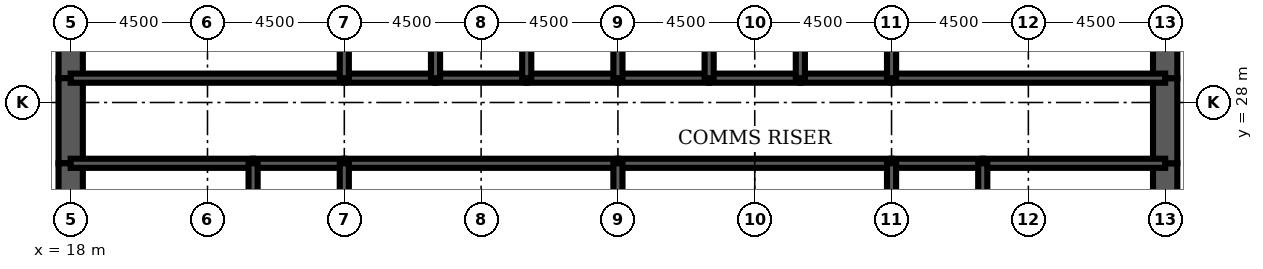
"""IFC4 building model, lengths in metres.
Left out: names, types, materials, properties, quantities, classifications, styles, units other than length and angle.
Written with IfcOpenShell. Run it as: python <this file> out.ifc"""

import sys

from ifc_helpers import new_model, si_unit, direction, frame, frame_2d, origin, place, context, subcontext, project, spatial, rectangle, extrude, element, fill, save


model = new_model("IFC4")
c1 = context("Model", 3, precision=1e-05, world=origin(), true_north=direction((0.0, 1.0)))
c2 = subcontext(c1, "Body", "Model", "MODEL_VIEW")
j1 = project(units=[si_unit("LENGTHUNIT", "METRE"), si_unit("PLANEANGLEUNIT", "RADIAN")], contexts=[c1])
p1 = place(None, origin())
s1 = spatial("IfcSite", under=j1, at=p1, CompositionType="ELEMENT")
p2 = place(p1, origin())
s2 = spatial("IfcBuilding", under=s1, at=p2, CompositionType="ELEMENT")
p3 = place(p2, frame((0.0, 0.0, 248.8)))
s3 = spatial("IfcBuildingStorey", under=s2, at=p3, CompositionType="ELEMENT", Elevation=248.8)
p4 = place(p3, frame((18.0, 32.0, 0.0), z_axis=(0.0, 0.0, 1.0), x_axis=(0.0, -1.0, 0.0)))
e1 = element("IfcWall", 1, at=p4, inside=s3, PredefinedType="SHEAR", context=c2, shape_type="SweptSolid", body=[
    extrude(rectangle(XDim=3.2, YDim=0.8, at=frame_2d((1.6, 0.0))), origin(), (0.0, 0.0, 1.0), 4.2),
])
p5 = place(p3, frame((18.0, 28.8, 0.0), z_axis=(0.0, 0.0, 1.0), x_axis=(0.0, -1.0, 0.0)))
e2 = element("IfcWall", 2, at=p5, inside=s3, PredefinedType="SHEAR", context=c2, shape_type="SweptSolid", body=[
    extrude(rectangle(XDim=2.8, YDim=0.8, at=frame_2d((1.4, 0.0))), origin(), (0.0, 0.0, 1.0), 4.2),
])
p6 = place(p5, frame((0.4, 0.0, 0.0)))
e3 = element("IfcOpeningElement", 3, at=p6, cuts=e2, PredefinedType="OPENING", context=c2, shape_type="SweptSolid", body=[
    extrude(rectangle(XDim=1.8, YDim=2.1, at=frame_2d((0.9, 1.05))), frame((0.0, 0.41, 0.0), z_axis=(0.0, -1.0, 0.0), x_axis=(1.0, 0.0, 0.0)), (0.0, 0.0, 1.0), 0.82),
])
for number, where, z_axis, x_axis in (
    (4, (18.0, 26.0, 0.0), (0.0, 0.0, 1.0), (0.0, -1.0, 0.0)),
    (5, (54.0, 22.0, 0.0), (0.0, 0.0, 1.0), (0.0, 1.0, 0.0)),
):
    element("IfcWall", number, at=place(p3, frame(where, z_axis=z_axis, x_axis=x_axis)), inside=s3, PredefinedType="SHEAR", context=c2, shape_type="SweptSolid", body=[
        extrude(rectangle(XDim=4.0, YDim=0.8, at=frame_2d((2.0, 0.0))), origin(), (0.0, 0.0, 1.0), 4.2),
    ])
p7 = place(p3, frame((54.0, 26.0, 0.0), z_axis=(0.0, 0.0, 1.0), x_axis=(0.0, 1.0, 0.0)))
e6 = element("IfcWall", 6, at=p7, inside=s3, PredefinedType="SHEAR", context=c2, shape_type="SweptSolid", body=[
    extrude(rectangle(XDim=2.8, YDim=0.8, at=frame_2d((1.4, 0.0))), origin(), (0.0, 0.0, 1.0), 4.2),
])
p8 = place(p7, frame((0.6, 0.0, 0.0)))
e7 = element("IfcOpeningElement", 7, at=p8, cuts=e6, PredefinedType="OPENING", context=c2, shape_type="SweptSolid", body=[
    extrude(rectangle(XDim=1.8, YDim=2.1, at=frame_2d((0.9, 1.05))), frame((0.0, 0.41, 0.0), z_axis=(0.0, -1.0, 0.0), x_axis=(1.0, 0.0, 0.0)), (0.0, 0.0, 1.0), 0.82),
])
p9 = place(p3, frame((54.0, 28.8, 0.0), z_axis=(0.0, 0.0, 1.0), x_axis=(0.0, 1.0, 0.0)))
e8 = element("IfcWall", 8, at=p9, inside=s3, PredefinedType="SHEAR", context=c2, shape_type="SweptSolid", body=[
    extrude(rectangle(XDim=3.2, YDim=0.8, at=frame_2d((1.6, 0.0))), origin(), (0.0, 0.0, 1.0), 4.2),
])
p10 = place(p3, frame((18.0, 28.8, 0.0), z_axis=(0.0, 0.0, 1.0), x_axis=(1.0, 0.0, 0.0)))
e9 = element("IfcWall", 9, at=p10, inside=s3, PredefinedType="SOLIDWALL", context=c2, shape_type="SweptSolid", body=[
    extrude(rectangle(XDim=9.0, YDim=0.3, at=frame_2d((4.5, 0.0))), origin(), (0.0, 0.0, 1.0), 4.2),
])
p11 = place(p10, frame((0.65, 0.0, 0.0)))
e10 = element("IfcOpeningElement", 10, at=p11, cuts=e9, PredefinedType="OPENING", context=c2, shape_type="SweptSolid", body=[
    extrude(rectangle(XDim=1.0, YDim=2.1, at=frame_2d((0.5, 1.05))), frame((0.0, 0.16, 0.0), z_axis=(0.0, -1.0, 0.0), x_axis=(1.0, 0.0, 0.0)), (0.0, 0.0, 1.0), 0.32),
])
p12 = place(p3, frame((27.0, 28.8, 0.0), z_axis=(0.0, 0.0, 1.0), x_axis=(1.0, 0.0, 0.0)))
e11 = element("IfcWall", 11, at=p12, inside=s3, PredefinedType="SOLIDWALL", context=c2, shape_type="SweptSolid", body=[
    extrude(rectangle(XDim=3.0, YDim=0.3, at=frame_2d((1.5, 0.0))), origin(), (0.0, 0.0, 1.0), 4.2),
])
p13 = place(p12, frame((0.95, 0.0, 0.0)))
e12 = element("IfcOpeningElement", 12, at=p13, cuts=e11, PredefinedType="OPENING", context=c2, shape_type="SweptSolid", body=[
    extrude(rectangle(XDim=1.1, YDim=2.2, at=frame_2d((0.55, 1.1))), frame((0.0, 0.16, 0.0), z_axis=(0.0, -1.0, 0.0), x_axis=(1.0, 0.0, 0.0)), (0.0, 0.0, 1.0), 0.32),
])
p14 = place(p3, frame((30.0, 28.8, 0.0), z_axis=(0.0, 0.0, 1.0), x_axis=(1.0, 0.0, 0.0)))
e13 = element("IfcWall", 13, at=p14, inside=s3, PredefinedType="SOLIDWALL", context=c2, shape_type="SweptSolid", body=[
    extrude(rectangle(XDim=3.0, YDim=0.3, at=frame_2d((1.5, 0.0))), origin(), (0.0, 0.0, 1.0), 4.2),
])
p15 = place(p14, frame((0.95, 0.0, 0.0)))
e14 = element("IfcOpeningElement", 14, at=p15, cuts=e13, PredefinedType="OPENING", context=c2, shape_type="SweptSolid", body=[
    extrude(rectangle(XDim=1.1, YDim=2.2, at=frame_2d((0.55, 1.1))), frame((0.0, 0.16, 0.0), z_axis=(0.0, -1.0, 0.0), x_axis=(1.0, 0.0, 0.0)), (0.0, 0.0, 1.0), 0.32),
])
p16 = place(p3, frame((33.0, 28.8, 0.0), z_axis=(0.0, 0.0, 1.0), x_axis=(1.0, 0.0, 0.0)))
e15 = element("IfcWall", 15, at=p16, inside=s3, PredefinedType="SOLIDWALL", context=c2, shape_type="SweptSolid", body=[
    extrude(rectangle(XDim=3.0, YDim=0.3, at=frame_2d((1.5, 0.0))), origin(), (0.0, 0.0, 1.0), 4.2),
])
p17 = place(p16, frame((0.95, 0.0, 0.0)))
e16 = element("IfcOpeningElement", 16, at=p17, cuts=e15, PredefinedType="OPENING", context=c2, shape_type="SweptSolid", body=[
    extrude(rectangle(XDim=1.1, YDim=2.2, at=frame_2d((0.55, 1.1))), frame((0.0, 0.16, 0.0), z_axis=(0.0, -1.0, 0.0), x_axis=(1.0, 0.0, 0.0)), (0.0, 0.0, 1.0), 0.32),
])
for number, where, z_axis, x_axis in (
    (17, (36.0, 28.8, 0.0), (0.0, 0.0, 1.0), (1.0, 0.0, 0.0)),
    (18, (39.0, 28.8, 0.0), (0.0, 0.0, 1.0), (1.0, 0.0, 0.0)),
):
    element("IfcWall", number, at=place(p3, frame(where, z_axis=z_axis, x_axis=x_axis)), inside=s3, PredefinedType="SOLIDWALL", context=c2, shape_type="SweptSolid", body=[
        extrude(rectangle(XDim=3.0, YDim=0.3, at=frame_2d((1.5, 0.0))), origin(), (0.0, 0.0, 1.0), 4.2),
    ])
p18 = place(p3, frame((42.0, 28.8, 0.0), z_axis=(0.0, 0.0, 1.0), x_axis=(1.0, 0.0, 0.0)))
e19 = element("IfcWall", 19, at=p18, inside=s3, PredefinedType="SOLIDWALL", context=c2, shape_type="SweptSolid", body=[
    extrude(rectangle(XDim=3.0, YDim=0.3, at=frame_2d((1.5, 0.0))), origin(), (0.0, 0.0, 1.0), 4.2),
])
p19 = place(p18, frame((0.95, 0.0, 0.0)))
e20 = element("IfcOpeningElement", 20, at=p19, cuts=e19, PredefinedType="OPENING", context=c2, shape_type="SweptSolid", body=[
    extrude(rectangle(XDim=1.1, YDim=2.2, at=frame_2d((0.55, 1.1))), frame((0.0, 0.16, 0.0), z_axis=(0.0, -1.0, 0.0), x_axis=(1.0, 0.0, 0.0)), (0.0, 0.0, 1.0), 0.32),
])
p20 = place(p3, frame((45.0, 28.8, 0.0), z_axis=(0.0, 0.0, 1.0), x_axis=(1.0, 0.0, 0.0)))
e21 = element("IfcWall", 21, at=p20, inside=s3, PredefinedType="SOLIDWALL", context=c2, shape_type="SweptSolid", body=[
    extrude(rectangle(XDim=9.0, YDim=0.3, at=frame_2d((4.5, 0.0))), origin(), (0.0, 0.0, 1.0), 4.2),
])
p21 = place(p20, frame((7.35, 0.0, 0.0)))
e22 = element("IfcOpeningElement", 22, at=p21, cuts=e21, PredefinedType="OPENING", context=c2, shape_type="SweptSolid", body=[
    extrude(rectangle(XDim=1.0, YDim=2.1, at=frame_2d((0.5, 1.05))), frame((0.0, 0.16, 0.0), z_axis=(0.0, -1.0, 0.0), x_axis=(1.0, 0.0, 0.0)), (0.0, 0.0, 1.0), 0.32),
])
p22 = place(p3, frame((18.0, 26.0, 0.0), z_axis=(0.0, 0.0, 1.0), x_axis=(1.0, 0.0, 0.0)))
e23 = element("IfcWall", 23, at=p22, inside=s3, PredefinedType="SOLIDWALL", context=c2, shape_type="SweptSolid", body=[
    extrude(rectangle(XDim=6.0, YDim=0.3, at=frame_2d((3.0, 0.0))), origin(), (0.0, 0.0, 1.0), 4.2),
])
p23 = place(p3, frame((24.0, 26.0, 0.0), z_axis=(0.0, 0.0, 1.0), x_axis=(1.0, 0.0, 0.0)))
e24 = element("IfcWall", 24, at=p23, inside=s3, PredefinedType="SOLIDWALL", context=c2, shape_type="SweptSolid", body=[
    extrude(rectangle(XDim=3.0, YDim=0.3, at=frame_2d((1.5, 0.0))), origin(), (0.0, 0.0, 1.0), 4.2),
])
for number, where, z_axis, x_axis in (
    (25, (27.0, 26.0, 0.0), (0.0, 0.0, 1.0), (1.0, 0.0, 0.0)),
    (26, (36.0, 26.0, 0.0), (0.0, 0.0, 1.0), (1.0, 0.0, 0.0)),
):
    element("IfcWall", number, at=place(p3, frame(where, z_axis=z_axis, x_axis=x_axis)), inside=s3, PredefinedType="SOLIDWALL", context=c2, shape_type="SweptSolid", body=[
        extrude(rectangle(XDim=9.0, YDim=0.3, at=frame_2d((4.5, 0.0))), origin(), (0.0, 0.0, 1.0), 4.2),
    ])
p24 = place(p3, frame((45.0, 26.0, 0.0), z_axis=(0.0, 0.0, 1.0), x_axis=(1.0, 0.0, 0.0)))
e27 = element("IfcWall", 27, at=p24, inside=s3, PredefinedType="SOLIDWALL", context=c2, shape_type="SweptSolid", body=[
    extrude(rectangle(XDim=3.0, YDim=0.3, at=frame_2d((1.5, 0.0))), origin(), (0.0, 0.0, 1.0), 4.2),
])
p25 = place(p3, frame((48.0, 26.0, 0.0), z_axis=(0.0, 0.0, 1.0), x_axis=(1.0, 0.0, 0.0)))
e28 = element("IfcWall", 28, at=p25, inside=s3, PredefinedType="SOLIDWALL", context=c2, shape_type="SweptSolid", body=[
    extrude(rectangle(XDim=6.0, YDim=0.3, at=frame_2d((3.0, 0.0))), origin(), (0.0, 0.0, 1.0), 4.2),
])
for number, where, z_axis, x_axis in (
    (29, (27.0, 28.8, 0.0), (0.0, 0.0, 1.0), (0.0, 1.0, 0.0)),
    (30, (30.0, 28.8, 0.0), (0.0, 0.0, 1.0), (0.0, 1.0, 0.0)),
    (31, (33.0, 28.8, 0.0), (0.0, 0.0, 1.0), (0.0, 1.0, 0.0)),
    (32, (36.0, 28.8, 0.0), (0.0, 0.0, 1.0), (0.0, 1.0, 0.0)),
    (33, (39.0, 28.8, 0.0), (0.0, 0.0, 1.0), (0.0, 1.0, 0.0)),
    (34, (42.0, 28.8, 0.0), (0.0, 0.0, 1.0), (0.0, 1.0, 0.0)),
    (35, (45.0, 28.8, 0.0), (0.0, 0.0, 1.0), (0.0, 1.0, 0.0)),
):
    element("IfcWall", number, at=place(p3, frame(where, z_axis=z_axis, x_axis=x_axis)), inside=s3, PredefinedType="SOLIDWALL", context=c2, shape_type="SweptSolid", body=[
        extrude(rectangle(XDim=3.2, YDim=0.3, at=frame_2d((1.6, 0.0))), origin(), (0.0, 0.0, 1.0), 4.2),
    ])
for number, where, z_axis, x_axis in (
    (36, (24.0, 22.0, 0.0), (0.0, 0.0, 1.0), (0.0, 1.0, 0.0)),
    (37, (27.0, 22.0, 0.0), (0.0, 0.0, 1.0), (0.0, 1.0, 0.0)),
    (38, (36.0, 22.0, 0.0), (0.0, 0.0, 1.0), (0.0, 1.0, 0.0)),
    (39, (45.0, 22.0, 0.0), (0.0, 0.0, 1.0), (0.0, 1.0, 0.0)),
    (40, (48.0, 22.0, 0.0), (0.0, 0.0, 1.0), (0.0, 1.0, 0.0)),
):
    element("IfcWall", number, at=place(p3, frame(where, z_axis=z_axis, x_axis=x_axis)), inside=s3, PredefinedType="SOLIDWALL", context=c2, shape_type="SweptSolid", body=[
        extrude(rectangle(XDim=4.0, YDim=0.3, at=frame_2d((2.0, 0.0))), origin(), (0.0, 0.0, 1.0), 4.2),
    ])
p26 = place(p3, frame((42.0, 22.15, 0.0), z_axis=(0.0, 0.0, 1.0), x_axis=(0.0, 1.0, 0.0)))
e41 = element("IfcWall", 41, at=p26, inside=s3, PredefinedType="PARTITIONING", context=c2, shape_type="SweptSolid", body=[
    extrude(rectangle(XDim=3.7, YDim=0.15, at=frame_2d((1.85, 0.0))), origin(), (0.0, 0.0, 1.0), 3.0),
])
p27 = place(p26, frame((2.2, 0.0, 0.0)))
e42 = element("IfcOpeningElement", 42, at=p27, cuts=e41, PredefinedType="OPENING", context=c2, shape_type="SweptSolid", body=[
    extrude(rectangle(XDim=1.0, YDim=2.1, at=frame_2d((0.5, 1.05))), frame((0.0, 0.085, 0.0), z_axis=(0.0, -1.0, 0.0), x_axis=(1.0, 0.0, 0.0)), (0.0, 0.0, 1.0), 0.17),
])
p28 = place(p3, frame((20.575, 22.15, 0.0), z_axis=(0.0, 0.0, 1.0), x_axis=(0.0, 1.0, 0.0)))
e43 = element("IfcWall", 43, at=p28, inside=s3, PredefinedType="PARTITIONING", context=c2, shape_type="SweptSolid", body=[
    extrude(rectangle(XDim=3.7, YDim=0.15, at=frame_2d((1.85, 0.0))), origin(), (0.0, 0.0, 1.0), 3.0),
])
p29 = place(p27, origin())
e44 = element("IfcDoor", 44, at=p29, inside=s3, OperationType="SINGLE_SWING_RIGHT", PredefinedType="DOOR", context=c2, shape_type="SweptSolid", body=[
    extrude(rectangle(XDim=1.0, YDim=2.1, at=frame_2d((0.5, 1.05))), frame((0.0, 0.025, 0.0), z_axis=(0.0, -1.0, 0.0), x_axis=(1.0, 0.0, 0.0)), (0.0, 0.0, 1.0), 0.05),
])
fill(e42, e44)
p30 = place(p19, origin())
e45 = element("IfcDoor", 45, at=p30, inside=s3, OperationType="DOUBLE_DOOR_SLIDING", PredefinedType="USERDEFINED", context=c2, shape_type="SweptSolid", body=[
    extrude(rectangle(XDim=1.1, YDim=2.2, at=frame_2d((0.55, 1.1))), frame((0.0, 0.025, 0.0), z_axis=(0.0, -1.0, 0.0), x_axis=(1.0, 0.0, 0.0)), (0.0, 0.0, 1.0), 0.05),
])
fill(e20, e45)
p31 = place(p13, origin())
e46 = element("IfcDoor", 46, at=p31, inside=s3, OperationType="DOUBLE_DOOR_SLIDING", PredefinedType="USERDEFINED", context=c2, shape_type="SweptSolid", body=[
    extrude(rectangle(XDim=1.1, YDim=2.2, at=frame_2d((0.55, 1.1))), frame((0.0, 0.025, 0.0), z_axis=(0.0, -1.0, 0.0), x_axis=(1.0, 0.0, 0.0)), (0.0, 0.0, 1.0), 0.05),
])
fill(e12, e46)
p32 = place(p15, origin())
e47 = element("IfcDoor", 47, at=p32, inside=s3, OperationType="DOUBLE_DOOR_SLIDING", PredefinedType="USERDEFINED", context=c2, shape_type="SweptSolid", body=[
    extrude(rectangle(XDim=1.1, YDim=2.2, at=frame_2d((0.55, 1.1))), frame((0.0, 0.025, 0.0), z_axis=(0.0, -1.0, 0.0), x_axis=(1.0, 0.0, 0.0)), (0.0, 0.0, 1.0), 0.05),
])
fill(e14, e47)
p33 = place(p17, origin())
e48 = element("IfcDoor", 48, at=p33, inside=s3, OperationType="DOUBLE_DOOR_SLIDING", PredefinedType="USERDEFINED", context=c2, shape_type="SweptSolid", body=[
    extrude(rectangle(XDim=1.1, YDim=2.2, at=frame_2d((0.55, 1.1))), frame((0.0, 0.025, 0.0), z_axis=(0.0, -1.0, 0.0), x_axis=(1.0, 0.0, 0.0)), (0.0, 0.0, 1.0), 0.05),
])
fill(e16, e48)
p34 = place(p11, origin())
e49 = element("IfcDoor", 49, at=p34, inside=s3, OperationType="SINGLE_SWING_LEFT", PredefinedType="DOOR", context=c2, shape_type="SweptSolid", body=[
    extrude(rectangle(XDim=1.0, YDim=2.1, at=frame_2d((0.5, 1.05))), frame((0.0, 0.025, 0.0), z_axis=(0.0, -1.0, 0.0), x_axis=(1.0, 0.0, 0.0)), (0.0, 0.0, 1.0), 0.05),
])
fill(e10, e49)
p35 = place(p21, origin())
e50 = element("IfcDoor", 50, at=p35, inside=s3, OperationType="SINGLE_SWING_RIGHT", PredefinedType="DOOR", context=c2, shape_type="SweptSolid", body=[
    extrude(rectangle(XDim=1.0, YDim=2.1, at=frame_2d((0.5, 1.05))), frame((0.0, 0.025, 0.0), z_axis=(0.0, -1.0, 0.0), x_axis=(1.0, 0.0, 0.0)), (0.0, 0.0, 1.0), 0.05),
])
fill(e22, e50)
p36 = place(p6, origin())
e51 = element("IfcDoor", 51, at=p36, inside=s3, OperationType="SINGLE_SWING_LEFT", PredefinedType="DOOR", context=c2, shape_type="SweptSolid", body=[
    extrude(rectangle(XDim=1.8, YDim=2.1, at=frame_2d((0.9, 1.05))), frame((0.0, 0.4, 0.0), z_axis=(0.0, -1.0, 0.0), x_axis=(1.0, 0.0, 0.0)), (0.0, 0.0, 1.0), 0.8),
])
fill(e3, e51)
p37 = place(p8, origin())
e52 = element("IfcDoor", 52, at=p37, inside=s3, OperationType="SINGLE_SWING_LEFT", PredefinedType="DOOR", context=c2, shape_type="SweptSolid", body=[
    extrude(rectangle(XDim=1.8, YDim=2.1, at=frame_2d((0.9, 1.05))), frame((0.0, 0.4, 0.0), z_axis=(0.0, -1.0, 0.0), x_axis=(1.0, 0.0, 0.0)), (0.0, 0.0, 1.0), 0.8),
])
fill(e7, e52)
save(model, sys.argv[1])
